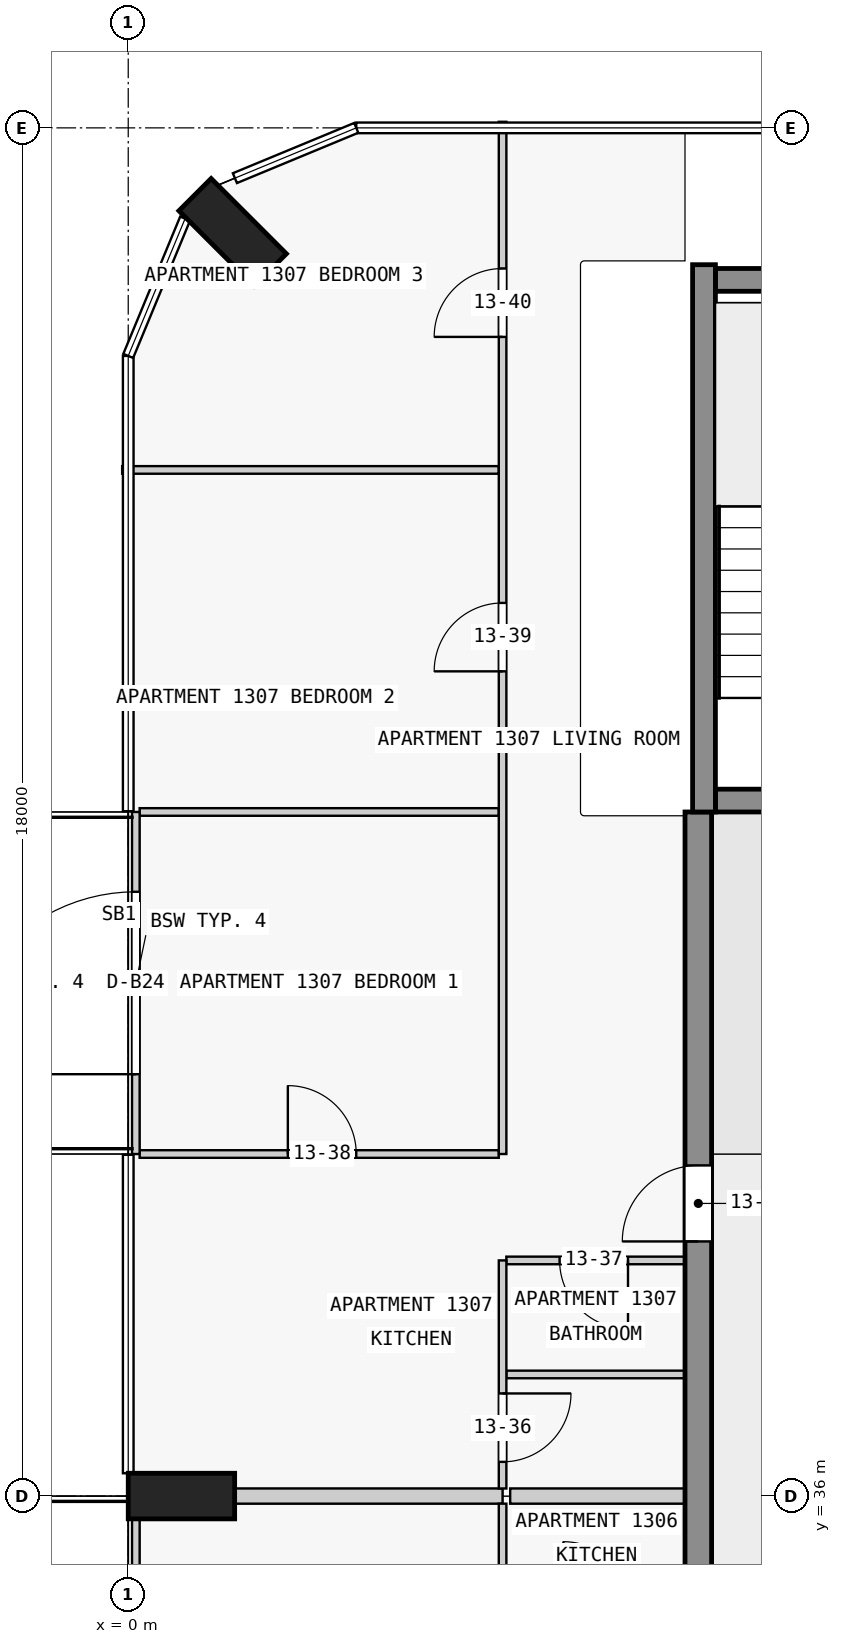
"""IFC4 building model, lengths in metres.
Left out: names, types, materials, properties, quantities, classifications, styles, units other than length and angle.
Written with IfcOpenShell. Run it as: python <this file> out.ifc"""

import sys

from ifc_helpers import new_model, si_unit, direction, frame, frame_2d, origin, origin_2d, place, context, subcontext, project, spatial, rectangle, extrude, element, fill, save


model = new_model("IFC4")
c1 = context("Model", 3, precision=1e-05, world=origin(), true_north=direction((0.0, 1.0)))
c2 = subcontext(c1, "Body", "Model", "MODEL_VIEW")
j1 = project(units=[si_unit("LENGTHUNIT", "METRE"), si_unit("PLANEANGLEUNIT", "RADIAN")], contexts=[c1])
p1 = place(None, origin())
s1 = spatial("IfcSite", under=j1, at=p1, CompositionType="ELEMENT")
p2 = place(p1, origin())
s2 = spatial("IfcBuilding", under=s1, at=p2, CompositionType="ELEMENT")
p3 = place(p2, frame((0.0, 0.0, 54.8)))
s3 = spatial("IfcBuildingStorey", under=s2, at=p3, CompositionType="ELEMENT", Elevation=54.8)
for number, where, z_axis, x_axis in (
    (1, (1.374, 52.626, 0.0), (0.0, 0.0, 1.0), (0.707, 0.707, 0.0)),
    (2, (0.7, 36.0, 0.0), (0.0, 0.0, 1.0), (0.0, 1.0, 0.0)),
):
    element("IfcColumn", number, at=place(p3, frame(where, z_axis=z_axis, x_axis=x_axis)), inside=s3, PredefinedType="COLUMN", context=c2, shape_type="SweptSolid", body=[
        extrude(rectangle(XDim=0.6, YDim=1.4, at=origin_2d()), origin(), (0.0, 0.0, 1.0), 3.5),
    ])
p4 = place(p3, frame((7.725, 45.15, 0.0), z_axis=(0.0, 0.0, 1.0), x_axis=(1.0, 0.0, 0.0)))
e3 = element("IfcWall", 3, at=p4, inside=s3, PredefinedType="SHEAR", context=c2, shape_type="SweptSolid", body=[
    extrude(rectangle(XDim=2.55, YDim=0.3, at=frame_2d((1.275, 0.0))), origin(), (0.0, 0.0, 1.0), 3.5),
])
p5 = place(p4, frame((0.725, 0.0, 0.0)))
e4 = element("IfcOpeningElement", 4, at=p5, cuts=e3, PredefinedType="OPENING", context=c2, shape_type="SweptSolid", body=[
    extrude(rectangle(XDim=1.1, YDim=2.1, at=frame_2d((0.55, 1.05))), frame((0.0, 0.16, 0.0), z_axis=(0.0, -1.0, 0.0), x_axis=(1.0, 0.0, 0.0)), (0.0, 0.0, 1.0), 0.32),
])
p6 = place(p3, frame((7.725, 52.0, 0.0), z_axis=(0.0, 0.0, 1.0), x_axis=(1.0, 0.0, 0.0)))
e5 = element("IfcWall", 5, at=p6, inside=s3, PredefinedType="SHEAR", context=c2, shape_type="SweptSolid", body=[
    extrude(rectangle(XDim=2.55, YDim=0.3, at=frame_2d((1.275, 0.0))), origin(), (0.0, 0.0, 1.0), 3.5),
])
p7 = place(p3, frame((7.575, 45.0, 0.0), z_axis=(0.0, 0.0, 1.0), x_axis=(0.0, 1.0, 0.0)))
e6 = element("IfcWall", 6, at=p7, inside=s3, PredefinedType="SHEAR", context=c2, shape_type="SweptSolid", body=[
    extrude(rectangle(XDim=7.2, YDim=0.3, at=frame_2d((3.6, 0.0))), origin(), (0.0, 0.0, 1.0), 3.5),
])
p8 = place(p3, frame((7.5, 18.0, 0.0), z_axis=(0.0, 0.0, 1.0), x_axis=(0.0, 1.0, 0.0)))
e7 = element("IfcWall", 7, at=p8, inside=s3, PredefinedType="SHEAR", context=c2, shape_type="SweptSolid", body=[
    extrude(rectangle(XDim=27.0, YDim=0.35, at=frame_2d((13.5, 0.0))), origin(), (0.0, 0.0, 1.0), 3.25),
])
p9 = place(p8, frame((1.75, 0.0, 0.0)))
e8 = element("IfcOpeningElement", 8, at=p9, cuts=e7, PredefinedType="OPENING", context=c2, shape_type="SweptSolid", body=[
    extrude(rectangle(XDim=1.0, YDim=2.1, at=frame_2d((0.5, 1.05))), frame((0.0, 0.185, 0.0), z_axis=(0.0, -1.0, 0.0), x_axis=(1.0, 0.0, 0.0)), (0.0, 0.0, 1.0), 0.37),
])
p10 = place(p8, frame((8.55, 0.0, 0.0)))
e9 = element("IfcOpeningElement", 9, at=p10, cuts=e7, PredefinedType="OPENING", context=c2, shape_type="SweptSolid", body=[
    extrude(rectangle(XDim=1.0, YDim=2.1, at=frame_2d((0.5, 1.05))), frame((0.0, 0.185, 0.0), z_axis=(0.0, -1.0, 0.0), x_axis=(1.0, 0.0, 0.0)), (0.0, 0.0, 1.0), 0.37),
])
p11 = place(p8, frame((15.25, 0.0, 0.0)))
e10 = element("IfcOpeningElement", 10, at=p11, cuts=e7, PredefinedType="OPENING", context=c2, shape_type="SweptSolid", body=[
    extrude(rectangle(XDim=1.0, YDim=2.1, at=frame_2d((0.5, 1.05))), frame((0.0, 0.185, 0.0), z_axis=(0.0, -1.0, 0.0), x_axis=(1.0, 0.0, 0.0)), (0.0, 0.0, 1.0), 0.37),
])
p12 = place(p8, frame((21.35, 0.0, 0.0)))
e11 = element("IfcOpeningElement", 11, at=p12, cuts=e7, PredefinedType="OPENING", context=c2, shape_type="SweptSolid", body=[
    extrude(rectangle(XDim=1.0, YDim=2.1, at=frame_2d((0.5, 1.05))), frame((0.0, 0.185, 0.0), z_axis=(0.0, -1.0, 0.0), x_axis=(1.0, 0.0, 0.0)), (0.0, 0.0, 1.0), 0.37),
])
p13 = place(p3, frame((0.1, 31.5, 0.0), z_axis=(0.0, 0.0, 1.0), x_axis=(0.0, 1.0, 0.0)))
e12 = element("IfcWall", 12, at=p13, inside=s3, PredefinedType="STANDARD", context=c2, shape_type="SweptSolid", body=[
    extrude(rectangle(XDim=4.5, YDim=0.1, at=frame_2d((2.25, 0.0))), origin(), (0.0, 0.0, 1.0), 3.25),
])
p14 = place(p13, frame((1.05, 0.0, 0.0)))
e13 = element("IfcOpeningElement", 13, at=p14, cuts=e12, PredefinedType="OPENING", context=c2, shape_type="SweptSolid", body=[
    extrude(rectangle(XDim=2.4, YDim=2.4, at=frame_2d((1.2, 1.2))), frame((0.0, 0.06, 0.0), z_axis=(0.0, -1.0, 0.0), x_axis=(1.0, 0.0, 0.0)), (0.0, 0.0, 1.0), 0.12),
])
p15 = place(p3, frame((0.1, 40.5, 0.0), z_axis=(0.0, 0.0, 1.0), x_axis=(0.0, 1.0, 0.0)))
e14 = element("IfcWall", 14, at=p15, inside=s3, PredefinedType="STANDARD", context=c2, shape_type="SweptSolid", body=[
    extrude(rectangle(XDim=4.5, YDim=0.1, at=frame_2d((2.25, 0.0))), origin(), (0.0, 0.0, 1.0), 3.25),
])
p16 = place(p15, frame((1.05, 0.0, 0.0)))
e15 = element("IfcOpeningElement", 15, at=p16, cuts=e14, PredefinedType="OPENING", context=c2, shape_type="SweptSolid", body=[
    extrude(rectangle(XDim=2.4, YDim=2.4, at=frame_2d((1.2, 1.2))), frame((0.0, 0.06, 0.0), z_axis=(0.0, -1.0, 0.0), x_axis=(1.0, 0.0, 0.0)), (0.0, 0.0, 1.0), 0.12),
])
p17 = place(p3, frame((7.325, 36.0, 0.0), z_axis=(0.0, 0.0, 1.0), x_axis=(-1.0, 0.0, 0.0)))
e16 = element("IfcWall", 16, at=p17, inside=s3, PredefinedType="PARTITIONING", context=c2, shape_type="SweptSolid", body=[
    extrude(rectangle(XDim=2.3, YDim=0.2, at=frame_2d((1.15, 0.0))), origin(), (0.0, 0.0, 1.0), 3.25),
])
p18 = place(p3, frame((1.4, 36.0, 0.0), z_axis=(0.0, 0.0, 1.0), x_axis=(1.0, 0.0, 0.0)))
e17 = element("IfcWall", 17, at=p18, inside=s3, PredefinedType="PARTITIONING", context=c2, shape_type="SweptSolid", body=[
    extrude(rectangle(XDim=3.525, YDim=0.2, at=frame_2d((1.763, 0.0))), origin(), (0.0, 0.0, 1.0), 3.25),
])
p19 = place(p3, frame((7.325, 37.6, 0.0), z_axis=(0.0, 0.0, 1.0), x_axis=(-1.0, 0.0, 0.0)))
e18 = element("IfcWall", 18, at=p19, inside=s3, PredefinedType="PARTITIONING", context=c2, shape_type="SweptSolid", body=[
    extrude(rectangle(XDim=2.35, YDim=0.1, at=frame_2d((1.175, 0.0))), origin(), (0.0, 0.0, 1.0), 3.25),
])
p20 = place(p3, frame((7.325, 39.1, 0.0), z_axis=(0.0, 0.0, 1.0), x_axis=(-1.0, 0.0, 0.0)))
e19 = element("IfcWall", 19, at=p20, inside=s3, PredefinedType="PARTITIONING", context=c2, shape_type="SweptSolid", body=[
    extrude(rectangle(XDim=2.35, YDim=0.1, at=frame_2d((1.175, 0.0))), origin(), (0.0, 0.0, 1.0), 3.25),
])
p21 = place(p20, frame((0.75, 0.0, 0.0)))
e20 = element("IfcOpeningElement", 20, at=p21, cuts=e19, PredefinedType="OPENING", context=c2, shape_type="SweptSolid", body=[
    extrude(rectangle(XDim=0.9, YDim=2.1, at=frame_2d((0.45, 1.05))), frame((0.0, 0.06, 0.0), z_axis=(0.0, -1.0, 0.0), x_axis=(1.0, 0.0, 0.0)), (0.0, 0.0, 1.0), 0.12),
])
p22 = place(p3, frame((0.15, 40.5, 0.0), z_axis=(0.0, 0.0, 1.0), x_axis=(1.0, 0.0, 0.0)))
e21 = element("IfcWall", 21, at=p22, inside=s3, PredefinedType="PARTITIONING", context=c2, shape_type="SweptSolid", body=[
    extrude(rectangle(XDim=4.725, YDim=0.1, at=frame_2d((2.363, 0.0))), origin(), (0.0, 0.0, 1.0), 3.25),
])
p23 = place(p22, frame((1.95, 0.0, 0.0)))
e22 = element("IfcOpeningElement", 22, at=p23, cuts=e21, PredefinedType="OPENING", context=c2, shape_type="SweptSolid", body=[
    extrude(rectangle(XDim=0.9, YDim=2.1, at=frame_2d((0.45, 1.05))), frame((0.0, 0.06, 0.0), z_axis=(0.0, -1.0, 0.0), x_axis=(1.0, 0.0, 0.0)), (0.0, 0.0, 1.0), 0.12),
])
p24 = place(p3, frame((4.875, 45.0, 0.0), z_axis=(0.0, 0.0, 1.0), x_axis=(-1.0, 0.0, 0.0)))
e23 = element("IfcWall", 23, at=p24, inside=s3, PredefinedType="PARTITIONING", context=c2, shape_type="SweptSolid", body=[
    extrude(rectangle(XDim=4.725, YDim=0.1, at=frame_2d((2.363, 0.0))), origin(), (0.0, 0.0, 1.0), 3.25),
])
p25 = place(p3, frame((4.875, 49.5, 0.0), z_axis=(0.0, 0.0, 1.0), x_axis=(-1.0, 0.0, 0.0)))
e24 = element("IfcWall", 24, at=p25, inside=s3, PredefinedType="PARTITIONING", context=c2, shape_type="SweptSolid", body=[
    extrude(rectangle(XDim=4.955, YDim=0.1, at=frame_2d((2.478, 0.0))), origin(), (0.0, 0.0, 1.0), 3.25),
])
p26 = place(p3, frame((4.925, 35.9, 0.0), z_axis=(0.0, 0.0, 1.0), x_axis=(0.0, -1.0, 0.0)))
e25 = element("IfcWall", 25, at=p26, inside=s3, PredefinedType="PARTITIONING", context=c2, shape_type="SweptSolid", body=[
    extrude(rectangle(XDim=1.4, YDim=0.1, at=frame_2d((0.7, 0.0))), origin(), (0.0, 0.0, 1.0), 3.25),
])
p27 = place(p3, frame((4.925, 39.1, 0.0), z_axis=(0.0, 0.0, 1.0), x_axis=(0.0, -1.0, 0.0)))
e26 = element("IfcWall", 26, at=p27, inside=s3, PredefinedType="PARTITIONING", context=c2, shape_type="SweptSolid", body=[
    extrude(rectangle(XDim=3.0, YDim=0.1, at=frame_2d((1.5, 0.0))), origin(), (0.0, 0.0, 1.0), 3.25),
])
p28 = place(p27, frame((1.75, 0.0, 0.0)))
e27 = element("IfcOpeningElement", 27, at=p28, cuts=e26, PredefinedType="OPENING", context=c2, shape_type="SweptSolid", body=[
    extrude(rectangle(XDim=0.9, YDim=2.1, at=frame_2d((0.45, 1.05))), frame((0.0, 0.06, 0.0), z_axis=(0.0, -1.0, 0.0), x_axis=(1.0, 0.0, 0.0)), (0.0, 0.0, 1.0), 0.12),
])
p29 = place(p3, frame((4.925, 40.5, 0.0), z_axis=(0.0, 0.0, 1.0), x_axis=(0.0, 1.0, 0.0)))
e28 = element("IfcWall", 28, at=p29, inside=s3, PredefinedType="PARTITIONING", context=c2, shape_type="SweptSolid", body=[
    extrude(rectangle(XDim=13.58, YDim=0.1, at=frame_2d((6.79, 0.0))), origin(), (0.0, 0.0, 1.0), 3.25),
])
p30 = place(p29, frame((6.35, 0.0, 0.0)))
e29 = element("IfcOpeningElement", 29, at=p30, cuts=e28, PredefinedType="OPENING", context=c2, shape_type="SweptSolid", body=[
    extrude(rectangle(XDim=0.9, YDim=2.1, at=frame_2d((0.45, 1.05))), frame((0.0, 0.06, 0.0), z_axis=(0.0, -1.0, 0.0), x_axis=(1.0, 0.0, 0.0)), (0.0, 0.0, 1.0), 0.12),
])
p31 = place(p29, frame((10.75, 0.0, 0.0)))
e30 = element("IfcOpeningElement", 30, at=p31, cuts=e28, PredefinedType="OPENING", context=c2, shape_type="SweptSolid", body=[
    extrude(rectangle(XDim=0.9, YDim=2.1, at=frame_2d((0.45, 1.05))), frame((0.0, 0.06, 0.0), z_axis=(0.0, -1.0, 0.0), x_axis=(1.0, 0.0, 0.0)), (0.0, 0.0, 1.0), 0.12),
])
p32 = place(p16, origin())
e31 = element("IfcDoor", 31, at=p32, inside=s3, OperationType="SINGLE_SWING_LEFT", PredefinedType="DOOR", context=c2, shape_type="SweptSolid", body=[
    extrude(rectangle(XDim=2.4, YDim=2.4, at=frame_2d((1.2, 1.2))), frame((0.0, 0.025, 0.0), z_axis=(0.0, -1.0, 0.0), x_axis=(1.0, 0.0, 0.0)), (0.0, 0.0, 1.0), 0.05),
])
fill(e15, e31)
p33 = place(p12, origin())
e32 = element("IfcDoor", 32, at=p33, inside=s3, OperationType="SINGLE_SWING_RIGHT", PredefinedType="DOOR", context=c2, shape_type="SweptSolid", body=[
    extrude(rectangle(XDim=1.0, YDim=2.1, at=frame_2d((0.5, 1.05))), frame((0.0, 0.025, 0.0), z_axis=(0.0, -1.0, 0.0), x_axis=(1.0, 0.0, 0.0)), (0.0, 0.0, 1.0), 0.05),
])
fill(e11, e32)
p34 = place(p28, origin())
e33 = element("IfcDoor", 33, at=p34, inside=s3, OperationType="SINGLE_SWING_RIGHT", PredefinedType="DOOR", context=c2, shape_type="SweptSolid", body=[
    extrude(rectangle(XDim=0.9, YDim=2.1, at=frame_2d((0.45, 1.05))), frame((0.0, 0.025, 0.0), z_axis=(0.0, -1.0, 0.0), x_axis=(1.0, 0.0, 0.0)), (0.0, 0.0, 1.0), 0.05),
])
fill(e27, e33)
p35 = place(p21, origin())
e34 = element("IfcDoor", 34, at=p35, inside=s3, OperationType="SINGLE_SWING_RIGHT", PredefinedType="DOOR", context=c2, shape_type="SweptSolid", body=[
    extrude(rectangle(XDim=0.9, YDim=2.1, at=frame_2d((0.45, 1.05))), frame((0.0, 0.025, 0.0), z_axis=(0.0, -1.0, 0.0), x_axis=(1.0, 0.0, 0.0)), (0.0, 0.0, 1.0), 0.05),
])
fill(e20, e34)
p36 = place(p23, origin())
e35 = element("IfcDoor", 35, at=p36, inside=s3, OperationType="SINGLE_SWING_RIGHT", PredefinedType="DOOR", context=c2, shape_type="SweptSolid", body=[
    extrude(rectangle(XDim=0.9, YDim=2.1, at=frame_2d((0.45, 1.05))), frame((0.0, 0.025, 0.0), z_axis=(0.0, -1.0, 0.0), x_axis=(1.0, 0.0, 0.0)), (0.0, 0.0, 1.0), 0.05),
])
fill(e22, e35)
p37 = place(p30, origin())
e36 = element("IfcDoor", 36, at=p37, inside=s3, OperationType="SINGLE_SWING_RIGHT", PredefinedType="DOOR", context=c2, shape_type="SweptSolid", body=[
    extrude(rectangle(XDim=0.9, YDim=2.1, at=frame_2d((0.45, 1.05))), frame((0.0, 0.025, 0.0), z_axis=(0.0, -1.0, 0.0), x_axis=(1.0, 0.0, 0.0)), (0.0, 0.0, 1.0), 0.05),
])
fill(e29, e36)
p38 = place(p31, origin())
e37 = element("IfcDoor", 37, at=p38, inside=s3, OperationType="SINGLE_SWING_RIGHT", PredefinedType="DOOR", context=c2, shape_type="SweptSolid", body=[
    extrude(rectangle(XDim=0.9, YDim=2.1, at=frame_2d((0.45, 1.05))), frame((0.0, 0.025, 0.0), z_axis=(0.0, -1.0, 0.0), x_axis=(1.0, 0.0, 0.0)), (0.0, 0.0, 1.0), 0.05),
])
fill(e30, e37)
save(model, sys.argv[1])
